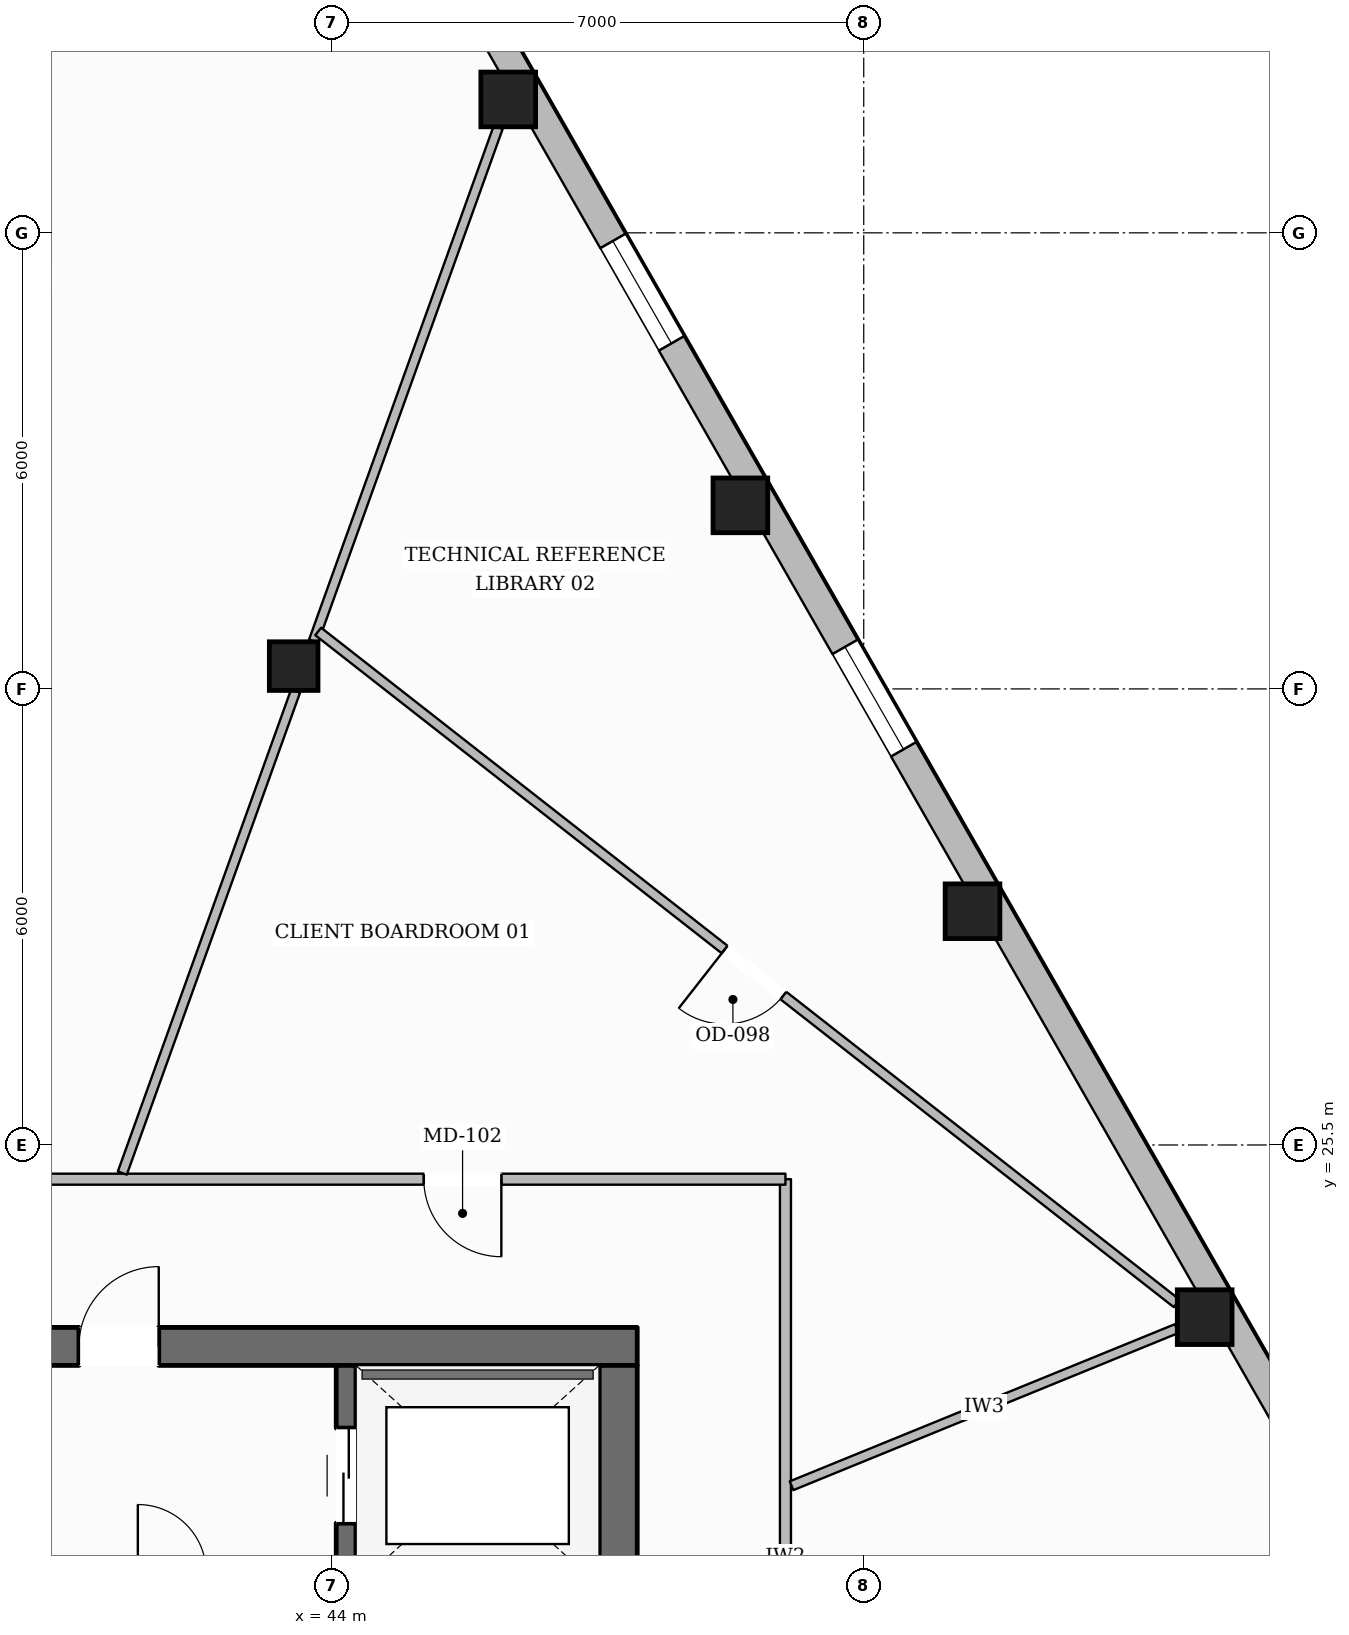
"""IFC4 building model, lengths in metres.
Left out: names, types, materials, properties, quantities, classifications, styles, units other than length and angle.
Written with IfcOpenShell. Run it as: python <this file> out.ifc"""

import sys

from ifc_helpers import new_model, si_unit, direction, frame, frame_2d, origin, origin_2d, place, context, subcontext, project, spatial, rectangle, hollow_rectangle, extrude, element, fill, save


model = new_model("IFC4")
c1 = context("Model", 3, precision=1e-05, world=origin(), true_north=direction((0.0, 1.0)))
c2 = subcontext(c1, "Body", "Model", "MODEL_VIEW")
j1 = project(units=[si_unit("LENGTHUNIT", "METRE"), si_unit("PLANEANGLEUNIT", "RADIAN")], contexts=[c1])
p1 = place(None, origin())
s1 = spatial("IfcSite", under=j1, at=p1, CompositionType="ELEMENT")
p2 = place(p1, origin())
s2 = spatial("IfcBuilding", under=s1, at=p2, CompositionType="ELEMENT")
p3 = place(p2, frame((0.0, 0.0, 147.1)))
s3 = spatial("IfcBuildingStorey", under=s2, at=p3, CompositionType="ELEMENT", Elevation=147.1)
p4 = place(p3, frame((27.98, 22.85, 0.0), z_axis=(0.0, 0.0, 1.0), x_axis=(1.0, 0.0, 0.0)))
e1 = element("IfcWall", 1, at=p4, inside=s3, PredefinedType="SOLIDWALL", context=c2, shape_type="SweptSolid", body=[
    extrude(rectangle(XDim=20.04, YDim=0.5, at=frame_2d((10.02, 0.0))), origin(), (0.0, 0.0, 1.0), 3.6),
])
p5 = place(p4, frame((6.295, 0.0, 0.0)))
e2 = element("IfcOpeningElement", 2, at=p5, cuts=e1, PredefinedType="OPENING", context=c2, shape_type="SweptSolid", body=[
    extrude(rectangle(XDim=1.05, YDim=2.15, at=frame_2d((0.525, 1.075))), frame((0.0, 0.26, 0.0), z_axis=(0.0, -1.0, 0.0), x_axis=(1.0, 0.0, 0.0)), (0.0, 0.0, 1.0), 0.52),
])
p6 = place(p4, frame((12.695, 0.0, 0.0)))
e3 = element("IfcOpeningElement", 3, at=p6, cuts=e1, PredefinedType="OPENING", context=c2, shape_type="SweptSolid", body=[
    extrude(rectangle(XDim=1.05, YDim=2.15, at=frame_2d((0.525, 1.075))), frame((0.0, 0.26, 0.0), z_axis=(0.0, -1.0, 0.0), x_axis=(1.0, 0.0, 0.0)), (0.0, 0.0, 1.0), 0.52),
])
p7 = place(p3, frame((47.77, 9.6, 0.0), z_axis=(0.0, 0.0, 1.0), x_axis=(0.0, 1.0, 0.0)))
e4 = element("IfcWall", 4, at=p7, inside=s3, PredefinedType="SOLIDWALL", context=c2, shape_type="SweptSolid", body=[
    extrude(rectangle(XDim=13.0, YDim=0.5, at=frame_2d((6.5, 0.0))), origin(), (0.0, 0.0, 1.0), 3.6),
])
p8 = place(p7, frame((0.2, 0.0, 0.0)))
e5 = element("IfcOpeningElement", 5, at=p8, cuts=e4, PredefinedType="OPENING", context=c2, shape_type="SweptSolid", body=[
    extrude(rectangle(XDim=1.1, YDim=2.15, at=frame_2d((0.55, 1.075))), frame((0.0, 0.26, 0.0), z_axis=(0.0, -1.0, 0.0), x_axis=(1.0, 0.0, 0.0)), (0.0, 0.0, 1.0), 0.52),
])
p9 = place(p7, frame((8.4, 0.0, 0.0)))
e6 = element("IfcOpeningElement", 6, at=p9, cuts=e4, PredefinedType="OPENING", context=c2, shape_type="SweptSolid", body=[
    extrude(rectangle(XDim=0.9, YDim=2.1, at=frame_2d((0.45, 1.05))), frame((0.0, 0.26, 0.0), z_axis=(0.0, -1.0, 0.0), x_axis=(1.0, 0.0, 0.0)), (0.0, 0.0, 1.0), 0.52),
])
p10 = place(p3, frame((44.19, 9.6, 0.0), z_axis=(0.0, 0.0, 1.0), x_axis=(0.0, 1.0, 0.0)))
e7 = element("IfcWall", 7, at=p10, inside=s3, PredefinedType="SHEAR", context=c2, shape_type="SweptSolid", body=[
    extrude(rectangle(XDim=13.0, YDim=0.26, at=frame_2d((6.5, 0.0))), origin(), (0.0, 0.0, 1.0), 3.6),
])
p11 = place(p10, frame((10.925, 0.0, 0.0)))
e8 = element("IfcOpeningElement", 8, at=p11, cuts=e7, PredefinedType="OPENING", context=c2, shape_type="SweptSolid", body=[
    extrude(rectangle(XDim=1.25, YDim=2.25, at=frame_2d((0.625, 1.125))), frame((0.0, 0.14, 0.0), z_axis=(0.0, -1.0, 0.0), x_axis=(1.0, 0.0, 0.0)), (0.0, 0.0, 1.0), 0.28),
])
for number, where, z_axis, x_axis in (
    (9, (55.486, 23.235, 0.0), (0.0, 0.0, 1.0), (1.0, 0.0, 0.0)),
    (10, (52.431, 28.575, 0.0), (0.0, 0.0, 1.0), (1.0, 0.0, 0.0)),
    (11, (49.377, 33.915, 0.0), (0.0, 0.0, 1.0), (1.0, 0.0, 0.0)),
    (12, (46.323, 39.255, 0.0), (0.0, 0.0, 1.0), (1.0, 0.0, 0.0)),
):
    element("IfcColumn", number, at=place(p3, frame(where, z_axis=z_axis, x_axis=x_axis)), inside=s3, PredefinedType="COLUMN", context=c2, shape_type="SweptSolid", body=[
        extrude(hollow_rectangle(XDim=0.72, YDim=0.72, WallThickness=0.032, at=origin_2d()), origin(), (0.0, 0.0, 1.0), 3.6),
    ])
p12 = place(p3, frame((43.5, 31.8, 0.0), z_axis=(0.0, 0.0, 1.0), x_axis=(1.0, 0.0, 0.0)))
e13 = element("IfcColumn", 13, at=p12, inside=s3, PredefinedType="COLUMN", context=c2, shape_type="SweptSolid", body=[
    extrude(hollow_rectangle(XDim=0.64, YDim=0.64, WallThickness=0.028, at=origin_2d()), origin(), (0.0, 0.0, 1.0), 3.6),
])
p13 = place(p3, frame((43.264, 45.146, 0.0), z_axis=(0.0, 0.0, 1.0), x_axis=(0.496479799544, -0.868048275527, 0.0)))
e14 = element("IfcWall", 14, at=p13, inside=s3, PredefinedType="STANDARD", context=c2, shape_type="SweptSolid", body=[
    extrude(rectangle(XDim=37.869, YDim=0.38, at=frame_2d((18.934, 0.0))), origin(), (0.0, 0.0, 1.0), 3.059),
])
p14 = place(p13, frame((33.541, 0.0, 0.65)))
e15 = element("IfcOpeningElement", 15, at=p14, cuts=e14, PredefinedType="OPENING", context=c2, shape_type="SweptSolid", body=[
    extrude(rectangle(XDim=1.55, YDim=1.75, at=frame_2d((0.775, 0.875))), frame((0.0, 0.2, 0.0), z_axis=(0.0, -1.0, 0.0), x_axis=(1.0, 0.0, 0.0)), (0.0, 0.0, 1.0), 0.4),
])
p15 = place(p13, frame((27.389, 0.0, 0.65)))
e16 = element("IfcOpeningElement", 16, at=p15, cuts=e14, PredefinedType="OPENING", context=c2, shape_type="SweptSolid", body=[
    extrude(rectangle(XDim=1.55, YDim=1.75, at=frame_2d((0.775, 0.875))), frame((0.0, 0.2, 0.0), z_axis=(0.0, -1.0, 0.0), x_axis=(1.0, 0.0, 0.0)), (0.0, 0.0, 1.0), 0.4),
])
p16 = place(p13, frame((15.085, 0.0, 0.65)))
e17 = element("IfcOpeningElement", 17, at=p16, cuts=e14, PredefinedType="OPENING", context=c2, shape_type="SweptSolid", body=[
    extrude(rectangle(XDim=1.55, YDim=1.75, at=frame_2d((0.775, 0.875))), frame((0.0, 0.2, 0.0), z_axis=(0.0, -1.0, 0.0), x_axis=(1.0, 0.0, 0.0)), (0.0, 0.0, 1.0), 0.4),
])
p17 = place(p13, frame((8.934, 0.0, 0.65)))
e18 = element("IfcOpeningElement", 18, at=p17, cuts=e14, PredefinedType="OPENING", context=c2, shape_type="SweptSolid", body=[
    extrude(rectangle(XDim=1.55, YDim=1.75, at=frame_2d((0.775, 0.875))), frame((0.0, 0.2, 0.0), z_axis=(0.0, -1.0, 0.0), x_axis=(1.0, 0.0, 0.0)), (0.0, 0.0, 1.0), 0.4),
])
p18 = place(p13, frame((2.782, 0.0, 0.65)))
e19 = element("IfcOpeningElement", 19, at=p18, cuts=e14, PredefinedType="OPENING", context=c2, shape_type="SweptSolid", body=[
    extrude(rectangle(XDim=1.55, YDim=1.75, at=frame_2d((0.775, 0.875))), frame((0.0, 0.2, 0.0), z_axis=(0.0, -1.0, 0.0), x_axis=(1.0, 0.0, 0.0)), (0.0, 0.0, 1.0), 0.4),
])
p19 = place(p3, frame((49.97, 7.15, 0.0), z_axis=(0.0, 0.0, 1.0), x_axis=(0.0, 1.0, 0.0)))
e20 = element("IfcWall", 20, at=p19, inside=s3, PredefinedType="PARTITIONING", context=c2, shape_type="SweptSolid", body=[
    extrude(rectangle(XDim=17.9, YDim=0.145, at=frame_2d((8.95, 0.0))), origin(), (0.0, 0.0, 1.0), 3.288),
])
p20 = place(p19, frame((6.317, 0.0, 0.0)))
e21 = element("IfcOpeningElement", 21, at=p20, cuts=e20, PredefinedType="OPENING", context=c2, shape_type="SweptSolid", body=[
    extrude(rectangle(XDim=1.4, YDim=2.2, at=frame_2d((0.7, 1.1))), frame((0.0, 0.083, 0.0), z_axis=(0.0, -1.0, 0.0), x_axis=(1.0, 0.0, 0.0)), (0.0, 0.0, 1.0), 0.165),
])
p21 = place(p3, frame((49.97, 25.05, 0.0), z_axis=(0.0, 0.0, 1.0), x_axis=(-1.0, 0.0, 0.0)))
e22 = element("IfcWall", 22, at=p21, inside=s3, PredefinedType="PARTITIONING", context=c2, shape_type="SweptSolid", body=[
    extrude(rectangle(XDim=23.94, YDim=0.145, at=frame_2d((11.97, 0.0))), origin(), (0.0, 0.0, 1.0), 3.6),
])
p22 = place(p21, frame((3.738, 0.0, 0.0)))
e23 = element("IfcOpeningElement", 23, at=p22, cuts=e22, PredefinedType="OPENING", context=c2, shape_type="SweptSolid", body=[
    extrude(rectangle(XDim=1.02, YDim=2.15, at=frame_2d((0.51, 1.075))), frame((0.0, 0.083, 0.0), z_axis=(0.0, -1.0, 0.0), x_axis=(1.0, 0.0, 0.0)), (0.0, 0.0, 1.0), 0.165),
])
p23 = place(p21, frame((12.624, 0.0, 0.0)))
e24 = element("IfcOpeningElement", 24, at=p23, cuts=e22, PredefinedType="OPENING", context=c2, shape_type="SweptSolid", body=[
    extrude(rectangle(XDim=1.4, YDim=2.2, at=frame_2d((0.7, 1.1))), frame((0.0, 0.083, 0.0), z_axis=(0.0, -1.0, 0.0), x_axis=(1.0, 0.0, 0.0)), (0.0, 0.0, 1.0), 0.165),
])
p24 = place(p3, frame((50.051, 21.017, 0.0), z_axis=(0.0, 0.0, 1.0), x_axis=(0.925879176325, 0.37781973327, 0.0)))
e25 = element("IfcWall", 25, at=p24, inside=s3, PredefinedType="PARTITIONING", context=c2, shape_type="SweptSolid", body=[
    extrude(rectangle(XDim=5.472, YDim=0.125, at=frame_2d((2.736, 0.0))), origin(), (0.0, 0.0, 1.0), 3.6),
])
p25 = place(p3, frame((41.246, 25.131, 0.0), z_axis=(0.0, 0.0, 1.0), x_axis=(0.338281948688, 0.94104480403, 0.0)))
e26 = element("IfcWall", 26, at=p25, inside=s3, PredefinedType="PARTITIONING", context=c2, shape_type="SweptSolid", body=[
    extrude(rectangle(XDim=6.739, YDim=0.125, at=frame_2d((3.369, 0.0))), origin(), (0.0, 0.0, 1.0), 3.141),
])
p26 = place(p3, frame((43.761, 32.128, 0.0), z_axis=(0.0, 0.0, 1.0), x_axis=(0.338249995955, 0.941056289622, 0.0)))
e27 = element("IfcWall", 27, at=p26, inside=s3, PredefinedType="PARTITIONING", context=c2, shape_type="SweptSolid", body=[
    extrude(rectangle(XDim=7.182, YDim=0.125, at=frame_2d((3.591, 0.0))), origin(), (0.0, 0.0, 1.0), 3.6),
])
p27 = place(p3, frame((55.117, 23.416, 0.0), z_axis=(0.0, 0.0, 1.0), x_axis=(-0.787472312848, 0.61635002758, 0.0)))
e28 = element("IfcWall", 28, at=p27, inside=s3, PredefinedType="PARTITIONING", context=c2, shape_type="SweptSolid", body=[
    extrude(rectangle(XDim=14.343, YDim=0.125, at=frame_2d((7.171, 0.0))), origin(), (0.0, 0.0, 1.0), 3.288),
])
p28 = place(p27, frame((6.572, 0.0, 0.0)))
e29 = element("IfcOpeningElement", 29, at=p28, cuts=e28, PredefinedType="OPENING", context=c2, shape_type="SweptSolid", body=[
    extrude(rectangle(XDim=0.98, YDim=2.15, at=frame_2d((0.49, 1.075))), frame((0.0, 0.073, 0.0), z_axis=(0.0, -1.0, 0.0), x_axis=(1.0, 0.0, 0.0)), (0.0, 0.0, 1.0), 0.145),
])
p29 = place(p3, frame((48.704, 3.063, 0.0), z_axis=(0.0, 0.0, 1.0), x_axis=(0.427883254749, 0.903834011478, 0.0)))
e30 = element("IfcWall", 30, at=p29, inside=s3, PredefinedType="PARTITIONING", context=c2, shape_type="SweptSolid", body=[
    extrude(rectangle(XDim=19.534, YDim=0.125, at=frame_2d((9.767, 0.0))), origin(), (0.0, 0.0, 1.0), 3.6),
])
p30 = place(p29, frame((9.277, 0.0, 0.0)))
e31 = element("IfcOpeningElement", 31, at=p30, cuts=e30, PredefinedType="OPENING", context=c2, shape_type="SweptSolid", body=[
    extrude(rectangle(XDim=0.98, YDim=2.15, at=frame_2d((0.49, 1.075))), frame((0.0, 0.073, 0.0), z_axis=(0.0, -1.0, 0.0), x_axis=(1.0, 0.0, 0.0)), (0.0, 0.0, 1.0), 0.145),
])
p31 = place(p16, origin())
e32 = element("IfcWindow", 32, at=p31, inside=s3, PartitioningType="SINGLE_PANEL", PredefinedType="WINDOW", context=c2, shape_type="SweptSolid", body=[
    extrude(rectangle(XDim=1.55, YDim=1.75, at=frame_2d((0.775, 0.875))), frame((0.0, 0.03, 0.0), z_axis=(0.0, -1.0, 0.0), x_axis=(1.0, 0.0, 0.0)), (0.0, 0.0, 1.0), 0.06),
])
fill(e17, e32)
p32 = place(p17, origin())
e33 = element("IfcWindow", 33, at=p32, inside=s3, PartitioningType="SINGLE_PANEL", PredefinedType="WINDOW", context=c2, shape_type="SweptSolid", body=[
    extrude(rectangle(XDim=1.55, YDim=1.75, at=frame_2d((0.775, 0.875))), frame((0.0, 0.03, 0.0), z_axis=(0.0, -1.0, 0.0), x_axis=(1.0, 0.0, 0.0)), (0.0, 0.0, 1.0), 0.06),
])
fill(e18, e33)
p33 = place(p6, origin())
e34 = element("IfcDoor", 34, at=p33, inside=s3, OperationType="SINGLE_SWING_RIGHT", PredefinedType="DOOR", context=c2, shape_type="SweptSolid", body=[
    extrude(rectangle(XDim=1.05, YDim=2.15, at=frame_2d((0.525, 1.075))), frame((0.0, 0.025, 0.0), z_axis=(0.0, -1.0, 0.0), x_axis=(1.0, 0.0, 0.0)), (0.0, 0.0, 1.0), 0.05),
])
fill(e3, e34)
p34 = place(p11, origin())
e35 = element("IfcDoor", 35, at=p34, inside=s3, OperationType="DOUBLE_DOOR_SLIDING", PredefinedType="DOOR", context=c2, shape_type="SweptSolid", body=[
    extrude(rectangle(XDim=1.25, YDim=2.25, at=frame_2d((0.625, 1.125))), frame((0.0, 0.025, 0.0), z_axis=(0.0, -1.0, 0.0), x_axis=(1.0, 0.0, 0.0)), (0.0, 0.0, 1.0), 0.05),
])
fill(e8, e35)
p35 = place(p22, origin())
e36 = element("IfcDoor", 36, at=p35, inside=s3, OperationType="SINGLE_SWING_LEFT", PredefinedType="DOOR", context=c2, shape_type="SweptSolid", body=[
    extrude(rectangle(XDim=1.02, YDim=2.15, at=frame_2d((0.51, 1.075))), frame((0.0, 0.025, 0.0), z_axis=(0.0, -1.0, 0.0), x_axis=(1.0, 0.0, 0.0)), (0.0, 0.0, 1.0), 0.05),
])
fill(e23, e36)
p36 = place(p28, origin())
e37 = element("IfcDoor", 37, at=p36, inside=s3, OperationType="SINGLE_SWING_RIGHT", PredefinedType="DOOR", context=c2, shape_type="SweptSolid", body=[
    extrude(rectangle(XDim=0.98, YDim=2.15, at=frame_2d((0.49, 1.075))), frame((0.0, 0.025, 0.0), z_axis=(0.0, -1.0, 0.0), x_axis=(1.0, 0.0, 0.0)), (0.0, 0.0, 1.0), 0.05),
])
fill(e29, e37)
save(model, sys.argv[1])
